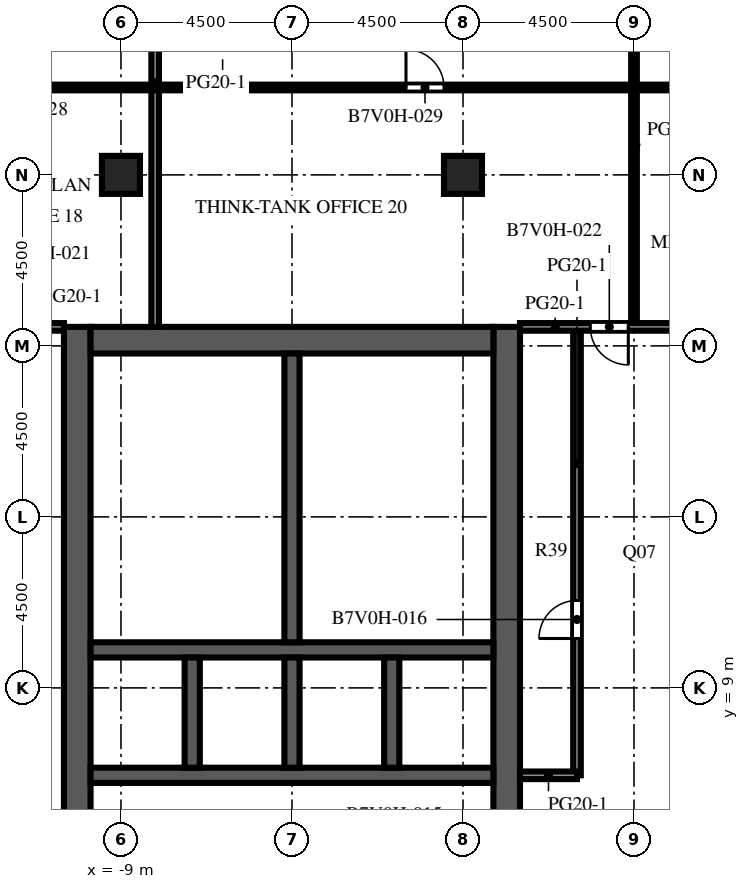
"""IFC4 building model, lengths in metres.
Left out: names, types, materials, properties, quantities, classifications, styles, units other than length and angle.
Written with IfcOpenShell. Run it as: python <this file> out.ifc"""

import sys

from ifc_helpers import new_model, si_unit, direction, frame, frame_2d, origin, origin_2d, place, context, subcontext, project, spatial, rectangle, extrude, element, fill, save


model = new_model("IFC4")
c1 = context("Model", 3, precision=1e-05, world=origin(), true_north=direction((0.0, 1.0)))
c2 = subcontext(c1, "Body", "Model", "MODEL_VIEW")
j1 = project(units=[si_unit("LENGTHUNIT", "METRE"), si_unit("PLANEANGLEUNIT", "RADIAN")], contexts=[c1])
p1 = place(None, origin())
s1 = spatial("IfcSite", under=j1, at=p1, CompositionType="ELEMENT")
p2 = place(p1, origin())
s2 = spatial("IfcBuilding", under=s1, at=p2, CompositionType="ELEMENT")
p3 = place(p2, frame((0.0, 0.0, 231.6)))
s3 = spatial("IfcBuildingStorey", under=s2, at=p3, CompositionType="ELEMENT", Elevation=231.6)
for number, where, z_axis, x_axis in (
    (1, (-9.0, 22.5, -0.45), (0.0, 0.0, 1.0), (1.0, 0.0, 0.0)),
    (2, (0.0, 22.5, -0.45), (0.0, 0.0, 1.0), (1.0, 0.0, 0.0)),
):
    element("IfcColumn", number, at=place(p3, frame(where, z_axis=z_axis, x_axis=x_axis)), inside=s3, PredefinedType="COLUMN", context=c2, shape_type="SweptSolid", body=[
        extrude(rectangle(XDim=1.0, YDim=1.0, at=origin_2d()), origin(), (0.0, 0.0, 1.0), 4.55),
    ])
p4 = place(p3, frame((-10.15, -9.0, 0.0), z_axis=(0.0, 0.0, 1.0), x_axis=(0.0, 1.0, 0.0)))
e3 = element("IfcWall", 3, at=p4, inside=s3, PredefinedType="SHEAR", context=c2, shape_type="SweptSolid", body=[
    extrude(rectangle(XDim=27.5, YDim=0.7, at=frame_2d((13.75, 0.0))), origin(), (0.0, 0.0, 1.0), 4.1),
])
p5 = place(p4, frame((12.55, 0.0, 0.0)))
e4 = element("IfcOpeningElement", 4, at=p5, cuts=e3, PredefinedType="OPENING", context=c2, shape_type="SweptSolid", body=[
    extrude(rectangle(XDim=2.4, YDim=2.4, at=frame_2d((1.2, 1.2))), frame((0.0, 0.36, 0.0), z_axis=(0.0, -1.0, 0.0), x_axis=(1.0, 0.0, 0.0)), (0.0, 0.0, 1.0), 0.72),
])
p6 = place(p4, frame((6.825, 0.0, 0.0)))
e5 = element("IfcOpeningElement", 5, at=p6, cuts=e3, PredefinedType="OPENING", context=c2, shape_type="SweptSolid", body=[
    extrude(rectangle(XDim=1.2, YDim=2.1, at=frame_2d((0.6, 1.05))), frame((0.0, 0.36, 0.0), z_axis=(0.0, -1.0, 0.0), x_axis=(1.0, 0.0, 0.0)), (0.0, 0.0, 1.0), 0.72),
])
p7 = place(p4, frame((19.475, 0.0, 0.0)))
e6 = element("IfcOpeningElement", 6, at=p7, cuts=e3, PredefinedType="OPENING", context=c2, shape_type="SweptSolid", body=[
    extrude(rectangle(XDim=1.2, YDim=2.1, at=frame_2d((0.6, 1.05))), frame((0.0, 0.36, 0.0), z_axis=(0.0, -1.0, 0.0), x_axis=(1.0, 0.0, 0.0)), (0.0, 0.0, 1.0), 0.72),
])
p8 = place(p3, frame((1.15, -9.0, 0.0), z_axis=(0.0, 0.0, 1.0), x_axis=(0.0, 1.0, 0.0)))
e7 = element("IfcWall", 7, at=p8, inside=s3, PredefinedType="SHEAR", context=c2, shape_type="SweptSolid", body=[
    extrude(rectangle(XDim=27.5, YDim=0.7, at=frame_2d((13.75, 0.0))), origin(), (0.0, 0.0, 1.0), 4.1),
])
p9 = place(p8, frame((12.55, 0.0, 0.0)))
e8 = element("IfcOpeningElement", 8, at=p9, cuts=e7, PredefinedType="OPENING", context=c2, shape_type="SweptSolid", body=[
    extrude(rectangle(XDim=2.4, YDim=2.4, at=frame_2d((1.2, 1.2))), frame((0.0, 0.36, 0.0), z_axis=(0.0, -1.0, 0.0), x_axis=(1.0, 0.0, 0.0)), (0.0, 0.0, 1.0), 0.72),
])
p10 = place(p8, frame((5.42, 0.0, 0.0)))
e9 = element("IfcOpeningElement", 9, at=p10, cuts=e7, PredefinedType="OPENING", context=c2, shape_type="SweptSolid", body=[
    extrude(rectangle(XDim=1.2, YDim=2.1, at=frame_2d((0.6, 1.05))), frame((0.0, 0.36, 0.0), z_axis=(0.0, -1.0, 0.0), x_axis=(1.0, 0.0, 0.0)), (0.0, 0.0, 1.0), 0.72),
])
p11 = place(p8, frame((19.46, 0.0, 0.0)))
e10 = element("IfcOpeningElement", 10, at=p11, cuts=e7, PredefinedType="OPENING", context=c2, shape_type="SweptSolid", body=[
    extrude(rectangle(XDim=1.0, YDim=2.1, at=frame_2d((0.5, 1.05))), frame((0.0, 0.36, 0.0), z_axis=(0.0, -1.0, 0.0), x_axis=(1.0, 0.0, 0.0)), (0.0, 0.0, 1.0), 0.72),
])
p12 = place(p8, frame((21.17, 0.0, 0.0)))
e11 = element("IfcOpeningElement", 11, at=p12, cuts=e7, PredefinedType="OPENING", context=c2, shape_type="SweptSolid", body=[
    extrude(rectangle(XDim=1.0, YDim=2.1, at=frame_2d((0.5, 1.05))), frame((0.0, 0.36, 0.0), z_axis=(0.0, -1.0, 0.0), x_axis=(1.0, 0.0, 0.0)), (0.0, 0.0, 1.0), 0.72),
])
p13 = place(p8, frame((23.26, 0.0, 0.0)))
e12 = element("IfcOpeningElement", 12, at=p13, cuts=e7, PredefinedType="OPENING", context=c2, shape_type="SweptSolid", body=[
    extrude(rectangle(XDim=1.0, YDim=2.1, at=frame_2d((0.5, 1.05))), frame((0.0, 0.36, 0.0), z_axis=(0.0, -1.0, 0.0), x_axis=(1.0, 0.0, 0.0)), (0.0, 0.0, 1.0), 0.72),
])
p14 = place(p8, frame((25.35, 0.0, 0.0)))
e13 = element("IfcOpeningElement", 13, at=p14, cuts=e7, PredefinedType="OPENING", context=c2, shape_type="SweptSolid", body=[
    extrude(rectangle(XDim=1.0, YDim=2.1, at=frame_2d((0.5, 1.05))), frame((0.0, 0.36, 0.0), z_axis=(0.0, -1.0, 0.0), x_axis=(1.0, 0.0, 0.0)), (0.0, 0.0, 1.0), 0.72),
])
p15 = place(p3, frame((-9.8, 18.15, 0.0), z_axis=(0.0, 0.0, 1.0), x_axis=(1.0, 0.0, 0.0)))
e14 = element("IfcWall", 14, at=p15, inside=s3, PredefinedType="SHEAR", context=c2, shape_type="SweptSolid", body=[
    extrude(rectangle(XDim=10.6, YDim=0.7, at=frame_2d((5.3, 0.0))), origin(), (0.0, 0.0, 1.0), 4.1),
])
p16 = place(p3, frame((-9.8, 6.7, 0.0), z_axis=(0.0, 0.0, 1.0), x_axis=(1.0, 0.0, 0.0)))
e15 = element("IfcWall", 15, at=p16, inside=s3, PredefinedType="SHEAR", context=c2, shape_type="SweptSolid", body=[
    extrude(rectangle(XDim=10.6, YDim=0.4, at=frame_2d((5.3, 0.0))), origin(), (0.0, 0.0, 1.0), 4.1),
])
p17 = place(p16, frame((3.438, 0.0, 0.0)))
e16 = element("IfcOpeningElement", 16, at=p17, cuts=e15, PredefinedType="OPENING", context=c2, shape_type="SweptSolid", body=[
    extrude(rectangle(XDim=1.1, YDim=2.1, at=frame_2d((0.55, 1.05))), frame((0.0, 0.21, 0.0), z_axis=(0.0, -1.0, 0.0), x_axis=(1.0, 0.0, 0.0)), (0.0, 0.0, 1.0), 0.42),
])
p18 = place(p16, frame((6.062, 0.0, 0.0)))
e17 = element("IfcOpeningElement", 17, at=p18, cuts=e15, PredefinedType="OPENING", context=c2, shape_type="SweptSolid", body=[
    extrude(rectangle(XDim=1.1, YDim=2.1, at=frame_2d((0.55, 1.05))), frame((0.0, 0.21, 0.0), z_axis=(0.0, -1.0, 0.0), x_axis=(1.0, 0.0, 0.0)), (0.0, 0.0, 1.0), 0.42),
])
p19 = place(p16, frame((8.812, 0.0, 0.0)))
e18 = element("IfcOpeningElement", 18, at=p19, cuts=e15, PredefinedType="OPENING", context=c2, shape_type="SweptSolid", body=[
    extrude(rectangle(XDim=1.1, YDim=2.1, at=frame_2d((0.55, 1.05))), frame((0.0, 0.21, 0.0), z_axis=(0.0, -1.0, 0.0), x_axis=(1.0, 0.0, 0.0)), (0.0, 0.0, 1.0), 0.42),
])
p20 = place(p16, frame((0.738, 0.0, 0.0)))
e19 = element("IfcOpeningElement", 19, at=p20, cuts=e15, PredefinedType="OPENING", context=c2, shape_type="SweptSolid", body=[
    extrude(rectangle(XDim=1.0, YDim=2.1, at=frame_2d((0.5, 1.05))), frame((0.0, 0.21, 0.0), z_axis=(0.0, -1.0, 0.0), x_axis=(1.0, 0.0, 0.0)), (0.0, 0.0, 1.0), 0.42),
])
p21 = place(p3, frame((-9.8, 10.0, 0.0), z_axis=(0.0, 0.0, 1.0), x_axis=(1.0, 0.0, 0.0)))
e20 = element("IfcWall", 20, at=p21, inside=s3, PredefinedType="SHEAR", context=c2, shape_type="SweptSolid", body=[
    extrude(rectangle(XDim=10.6, YDim=0.4, at=frame_2d((5.3, 0.0))), origin(), (0.0, 0.0, 1.0), 4.1),
])
for number, where, z_axis, x_axis in (
    (21, (-7.125, 6.9, 0.0), (0.0, 0.0, 1.0), (0.0, 1.0, 0.0)),
    (22, (-4.5, 6.9, 0.0), (0.0, 0.0, 1.0), (0.0, 1.0, 0.0)),
    (23, (-1.875, 6.9, 0.0), (0.0, 0.0, 1.0), (0.0, 1.0, 0.0)),
):
    element("IfcWall", number, at=place(p3, frame(where, z_axis=z_axis, x_axis=x_axis)), inside=s3, PredefinedType="SHEAR", context=c2, shape_type="SweptSolid", body=[
        extrude(rectangle(XDim=2.9, YDim=0.4, at=frame_2d((1.45, 0.0))), origin(), (0.0, 0.0, 1.0), 4.1),
    ])
p22 = place(p3, frame((-4.5, 10.2, 0.0), z_axis=(0.0, 0.0, 1.0), x_axis=(0.0, 1.0, 0.0)))
e24 = element("IfcWall", 24, at=p22, inside=s3, PredefinedType="SHEAR", context=c2, shape_type="SweptSolid", body=[
    extrude(rectangle(XDim=7.6, YDim=0.4, at=frame_2d((3.8, 0.0))), origin(), (0.0, 0.0, 1.0), 4.1),
])
for number, where, z_axis, x_axis in (
    (25, (-4.3, 11.72, 0.0), (0.0, 0.0, 1.0), (1.0, 0.0, 0.0)),
    (26, (-4.3, 13.62, 0.0), (0.0, 0.0, 1.0), (1.0, 0.0, 0.0)),
    (27, (-4.3, 15.9, 0.0), (0.0, 0.0, 1.0), (1.0, 0.0, 0.0)),
):
    element("IfcWall", number, at=place(p3, frame(where, z_axis=z_axis, x_axis=x_axis)), inside=s3, PredefinedType="PARTITIONING", context=c2, shape_type="SweptSolid", body=[
        extrude(rectangle(XDim=5.1, YDim=0.1, at=frame_2d((2.55, 0.0))), origin(), (0.0, 0.0, 1.0), 3.65),
    ])
p23 = place(p3, frame((-8.1, 18.5, 0.0), z_axis=(0.0, 0.0, 1.0), x_axis=(0.0, 1.0, 0.0)))
e28 = element("IfcWall", 28, at=p23, inside=s3, PredefinedType="PARTITIONING", context=c2, shape_type="SweptSolid", body=[
    extrude(rectangle(XDim=12.85, YDim=0.2, at=frame_2d((6.425, 0.0))), origin(), (0.0, 0.0, 1.0), 3.65),
])
p24 = place(p3, frame((3.0, 6.7, 0.0), z_axis=(0.0, 0.0, 1.0), x_axis=(0.0, 1.0, 0.0)))
e29 = element("IfcWall", 29, at=p24, inside=s3, PredefinedType="PARTITIONING", context=c2, shape_type="SweptSolid", body=[
    extrude(rectangle(XDim=11.8, YDim=0.2, at=frame_2d((5.9, 0.0))), origin(), (0.0, 0.0, 1.0), 3.65),
])
p25 = place(p24, frame((3.6, 0.0, 0.0)))
e30 = element("IfcOpeningElement", 30, at=p25, cuts=e29, PredefinedType="OPENING", context=c2, shape_type="SweptSolid", body=[
    extrude(rectangle(XDim=1.0, YDim=2.1, at=frame_2d((0.5, 1.05))), frame((0.0, 0.11, 0.0), z_axis=(0.0, -1.0, 0.0), x_axis=(1.0, 0.0, 0.0)), (0.0, 0.0, 1.0), 0.22),
])
p26 = place(p3, frame((4.5, 18.5, 0.0), z_axis=(0.0, 0.0, 1.0), x_axis=(0.0, 1.0, 0.0)))
e31 = element("IfcWall", 31, at=p26, inside=s3, PredefinedType="PARTITIONING", context=c2, shape_type="SweptSolid", body=[
    extrude(rectangle(XDim=8.1, YDim=0.15, at=frame_2d((4.05, 0.0))), origin(), (0.0, 0.0, 1.0), 3.65),
])
p27 = place(p3, frame((1.5, 6.7, 0.0), z_axis=(0.0, 0.0, 1.0), x_axis=(1.0, 0.0, 0.0)))
e32 = element("IfcWall", 32, at=p27, inside=s3, PredefinedType="PARTITIONING", context=c2, shape_type="SweptSolid", body=[
    extrude(rectangle(XDim=1.5, YDim=0.2, at=frame_2d((0.75, 0.0))), origin(), (0.0, 0.0, 1.0), 3.65),
])
p28 = place(p3, frame((-13.5, 18.5, 0.0), z_axis=(0.0, 0.0, 1.0), x_axis=(1.0, 0.0, 0.0)))
e33 = element("IfcWall", 33, at=p28, inside=s3, PredefinedType="PARTITIONING", context=c2, shape_type="SweptSolid", body=[
    extrude(rectangle(XDim=3.0, YDim=0.2, at=frame_2d((1.5, 0.0))), origin(), (0.0, 0.0, 1.0), 3.65),
])
p29 = place(p28, frame((0.85, 0.0, 0.0)))
e34 = element("IfcOpeningElement", 34, at=p29, cuts=e33, PredefinedType="OPENING", context=c2, shape_type="SweptSolid", body=[
    extrude(rectangle(XDim=1.0, YDim=2.1, at=frame_2d((0.5, 1.05))), frame((0.0, 0.11, 0.0), z_axis=(0.0, -1.0, 0.0), x_axis=(1.0, 0.0, 0.0)), (0.0, 0.0, 1.0), 0.22),
])
p30 = place(p3, frame((1.5, 18.5, 0.0), z_axis=(0.0, 0.0, 1.0), x_axis=(1.0, 0.0, 0.0)))
e35 = element("IfcWall", 35, at=p30, inside=s3, PredefinedType="PARTITIONING", context=c2, shape_type="SweptSolid", body=[
    extrude(rectangle(XDim=4.5, YDim=0.2, at=frame_2d((2.25, 0.0))), origin(), (0.0, 0.0, 1.0), 3.65),
])
p31 = place(p30, frame((1.85, 0.0, 0.0)))
e36 = element("IfcOpeningElement", 36, at=p31, cuts=e35, PredefinedType="OPENING", context=c2, shape_type="SweptSolid", body=[
    extrude(rectangle(XDim=1.0, YDim=2.1, at=frame_2d((0.5, 1.05))), frame((0.0, 0.11, 0.0), z_axis=(0.0, -1.0, 0.0), x_axis=(1.0, 0.0, 0.0)), (0.0, 0.0, 1.0), 0.22),
])
p32 = place(p3, frame((-13.5, 24.8, 0.0), z_axis=(0.0, 0.0, 1.0), x_axis=(1.0, 0.0, 0.0)))
e37 = element("IfcWall", 37, at=p32, inside=s3, PredefinedType="PARTITIONING", context=c2, shape_type="SweptSolid", body=[
    extrude(rectangle(XDim=34.5, YDim=0.15, at=frame_2d((17.25, 0.0))), origin(), (0.0, 0.0, 1.0), 3.65),
])
p33 = place(p32, frame((1.35, 0.0, 0.0)))
e38 = element("IfcOpeningElement", 38, at=p33, cuts=e37, PredefinedType="OPENING", context=c2, shape_type="SweptSolid", body=[
    extrude(rectangle(XDim=1.0, YDim=2.1, at=frame_2d((0.5, 1.05))), frame((0.0, 0.085, 0.0), z_axis=(0.0, -1.0, 0.0), x_axis=(1.0, 0.0, 0.0)), (0.0, 0.0, 1.0), 0.17),
])
p34 = place(p32, frame((12.0, 0.0, 0.0)))
e39 = element("IfcOpeningElement", 39, at=p34, cuts=e37, PredefinedType="OPENING", context=c2, shape_type="SweptSolid", body=[
    extrude(rectangle(XDim=1.0, YDim=2.1, at=frame_2d((0.5, 1.05))), frame((0.0, 0.085, 0.0), z_axis=(0.0, -1.0, 0.0), x_axis=(1.0, 0.0, 0.0)), (0.0, 0.0, 1.0), 0.17),
])
p35 = place(p32, frame((20.85, 0.0, 0.0)))
e40 = element("IfcOpeningElement", 40, at=p35, cuts=e37, PredefinedType="OPENING", context=c2, shape_type="SweptSolid", body=[
    extrude(rectangle(XDim=1.0, YDim=2.1, at=frame_2d((0.5, 1.05))), frame((0.0, 0.085, 0.0), z_axis=(0.0, -1.0, 0.0), x_axis=(1.0, 0.0, 0.0)), (0.0, 0.0, 1.0), 0.17),
])
p36 = place(p32, frame((29.85, 0.0, 0.0)))
e41 = element("IfcOpeningElement", 41, at=p36, cuts=e37, PredefinedType="OPENING", context=c2, shape_type="SweptSolid", body=[
    extrude(rectangle(XDim=1.0, YDim=2.1, at=frame_2d((0.5, 1.05))), frame((0.0, 0.085, 0.0), z_axis=(0.0, -1.0, 0.0), x_axis=(1.0, 0.0, 0.0)), (0.0, 0.0, 1.0), 0.17),
])
p37 = place(p17, origin())
e42 = element("IfcDoor", 42, at=p37, inside=s3, OperationType="DOUBLE_DOOR_SLIDING", PredefinedType="DOOR", context=c2, shape_type="SweptSolid", body=[
    extrude(rectangle(XDim=1.1, YDim=2.1, at=frame_2d((0.55, 1.05))), frame((0.0, 0.025, 0.0), z_axis=(0.0, -1.0, 0.0), x_axis=(1.0, 0.0, 0.0)), (0.0, 0.0, 1.0), 0.05),
])
fill(e16, e42)
p38 = place(p18, origin())
e43 = element("IfcDoor", 43, at=p38, inside=s3, OperationType="DOUBLE_DOOR_SLIDING", PredefinedType="DOOR", context=c2, shape_type="SweptSolid", body=[
    extrude(rectangle(XDim=1.1, YDim=2.1, at=frame_2d((0.55, 1.05))), frame((0.0, 0.025, 0.0), z_axis=(0.0, -1.0, 0.0), x_axis=(1.0, 0.0, 0.0)), (0.0, 0.0, 1.0), 0.05),
])
fill(e17, e43)
p39 = place(p19, origin())
e44 = element("IfcDoor", 44, at=p39, inside=s3, OperationType="DOUBLE_DOOR_SLIDING", PredefinedType="DOOR", context=c2, shape_type="SweptSolid", body=[
    extrude(rectangle(XDim=1.1, YDim=2.1, at=frame_2d((0.55, 1.05))), frame((0.0, 0.025, 0.0), z_axis=(0.0, -1.0, 0.0), x_axis=(1.0, 0.0, 0.0)), (0.0, 0.0, 1.0), 0.05),
])
fill(e18, e44)
p40 = place(p5, origin())
e45 = element("IfcDoor", 45, at=p40, inside=s3, OperationType="DOUBLE_DOOR_DOUBLE_SWING", PredefinedType="DOOR", context=c2, shape_type="SweptSolid", body=[
    extrude(rectangle(XDim=2.4, YDim=2.4, at=frame_2d((1.2, 1.2))), frame((0.0, 0.025, 0.0), z_axis=(0.0, -1.0, 0.0), x_axis=(1.0, 0.0, 0.0)), (0.0, 0.0, 1.0), 0.05),
])
fill(e4, e45)
p41 = place(p9, origin())
e46 = element("IfcDoor", 46, at=p41, inside=s3, OperationType="DOUBLE_DOOR_DOUBLE_SWING", PredefinedType="DOOR", context=c2, shape_type="SweptSolid", body=[
    extrude(rectangle(XDim=2.4, YDim=2.4, at=frame_2d((1.2, 1.2))), frame((0.0, 0.025, 0.0), z_axis=(0.0, -1.0, 0.0), x_axis=(1.0, 0.0, 0.0)), (0.0, 0.0, 1.0), 0.05),
])
fill(e8, e46)
p42 = place(p7, origin())
e47 = element("IfcDoor", 47, at=p42, inside=s3, OperationType="SINGLE_SWING_LEFT", PredefinedType="DOOR", context=c2, shape_type="SweptSolid", body=[
    extrude(rectangle(XDim=1.2, YDim=2.1, at=frame_2d((0.6, 1.05))), frame((0.0, 0.025, 0.0), z_axis=(0.0, -1.0, 0.0), x_axis=(1.0, 0.0, 0.0)), (0.0, 0.0, 1.0), 0.05),
])
fill(e6, e47)
p43 = place(p20, origin())
e48 = element("IfcDoor", 48, at=p43, inside=s3, OperationType="SINGLE_SWING_LEFT", PredefinedType="DOOR", context=c2, shape_type="SweptSolid", body=[
    extrude(rectangle(XDim=1.0, YDim=2.1, at=frame_2d((0.5, 1.05))), frame((0.0, 0.025, 0.0), z_axis=(0.0, -1.0, 0.0), x_axis=(1.0, 0.0, 0.0)), (0.0, 0.0, 1.0), 0.05),
])
fill(e19, e48)
p44 = place(p11, origin())
e49 = element("IfcDoor", 49, at=p44, inside=s3, OperationType="SINGLE_SWING_LEFT", PredefinedType="DOOR", context=c2, shape_type="SweptSolid", body=[
    extrude(rectangle(XDim=1.0, YDim=2.1, at=frame_2d((0.5, 1.05))), frame((0.0, 0.325, 0.0), z_axis=(0.0, -1.0, 0.0), x_axis=(1.0, 0.0, 0.0)), (0.0, 0.0, 1.0), 0.05),
])
fill(e10, e49)
p45 = place(p12, origin())
e50 = element("IfcDoor", 50, at=p45, inside=s3, OperationType="SINGLE_SWING_RIGHT", PredefinedType="DOOR", context=c2, shape_type="SweptSolid", body=[
    extrude(rectangle(XDim=1.0, YDim=2.1, at=frame_2d((0.5, 1.05))), frame((0.0, 0.325, 0.0), z_axis=(0.0, -1.0, 0.0), x_axis=(1.0, 0.0, 0.0)), (0.0, 0.0, 1.0), 0.05),
])
fill(e11, e50)
p46 = place(p13, origin())
e51 = element("IfcDoor", 51, at=p46, inside=s3, OperationType="SINGLE_SWING_LEFT", PredefinedType="DOOR", context=c2, shape_type="SweptSolid", body=[
    extrude(rectangle(XDim=1.0, YDim=2.1, at=frame_2d((0.5, 1.05))), frame((0.0, 0.325, 0.0), z_axis=(0.0, -1.0, 0.0), x_axis=(1.0, 0.0, 0.0)), (0.0, 0.0, 1.0), 0.05),
])
fill(e12, e51)
p47 = place(p14, origin())
e52 = element("IfcDoor", 52, at=p47, inside=s3, OperationType="SINGLE_SWING_RIGHT", PredefinedType="DOOR", context=c2, shape_type="SweptSolid", body=[
    extrude(rectangle(XDim=1.0, YDim=2.1, at=frame_2d((0.5, 1.05))), frame((0.0, 0.325, 0.0), z_axis=(0.0, -1.0, 0.0), x_axis=(1.0, 0.0, 0.0)), (0.0, 0.0, 1.0), 0.05),
])
fill(e13, e52)
p48 = place(p25, origin())
e53 = element("IfcDoor", 53, at=p48, inside=s3, OperationType="SINGLE_SWING_LEFT", PredefinedType="DOOR", context=c2, shape_type="SweptSolid", body=[
    extrude(rectangle(XDim=1.0, YDim=2.1, at=frame_2d((0.5, 1.05))), frame((0.0, 0.025, 0.0), z_axis=(0.0, -1.0, 0.0), x_axis=(1.0, 0.0, 0.0)), (0.0, 0.0, 1.0), 0.05),
])
fill(e30, e53)
p49 = place(p31, origin())
e54 = element("IfcDoor", 54, at=p49, inside=s3, OperationType="SINGLE_SWING_RIGHT", PredefinedType="DOOR", context=c2, shape_type="SweptSolid", body=[
    extrude(rectangle(XDim=1.0, YDim=2.1, at=frame_2d((0.5, 1.05))), frame((0.0, 0.025, 0.0), z_axis=(0.0, -1.0, 0.0), x_axis=(1.0, 0.0, 0.0)), (0.0, 0.0, 1.0), 0.05),
])
fill(e36, e54)
p50 = place(p34, origin())
e55 = element("IfcDoor", 55, at=p50, inside=s3, OperationType="SINGLE_SWING_LEFT", PredefinedType="DOOR", context=c2, shape_type="SweptSolid", body=[
    extrude(rectangle(XDim=1.0, YDim=2.1, at=frame_2d((0.5, 1.05))), frame((0.0, 0.025, 0.0), z_axis=(0.0, -1.0, 0.0), x_axis=(1.0, 0.0, 0.0)), (0.0, 0.0, 1.0), 0.05),
])
fill(e39, e55)
save(model, sys.argv[1])
